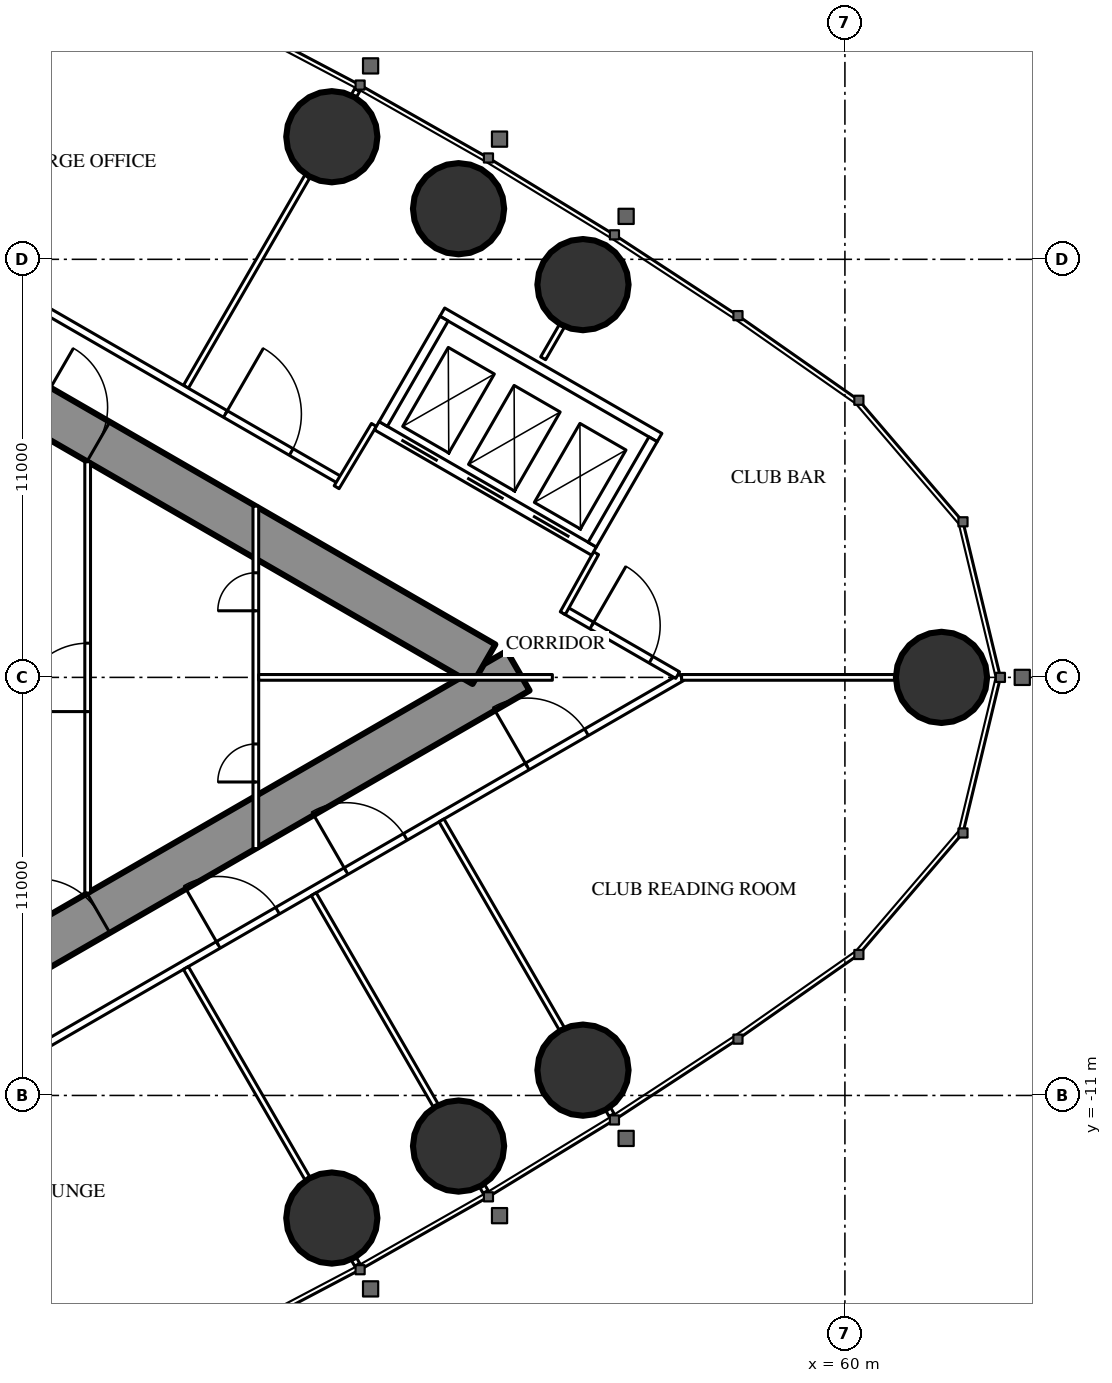
"""IFC4 building model, lengths in metres.
Left out: names, types, materials, properties, quantities, classifications, styles, units other than length and angle.
Written with IfcOpenShell. Run it as: python <this file> out.ifc"""

import sys

from ifc_helpers import new_model, si_unit, direction, frame, frame_2d, origin, origin_2d, place, context, subcontext, project, spatial, rectangle, circle, extrude, element, fill, save


model = new_model("IFC4")
c1 = context("Model", 3, precision=1e-05, world=origin(), true_north=direction((0.0, 1.0)))
c2 = subcontext(c1, "Body", "Model", "MODEL_VIEW")
j1 = project(units=[si_unit("LENGTHUNIT", "METRE"), si_unit("PLANEANGLEUNIT", "RADIAN")], contexts=[c1])
p1 = place(None, origin())
s1 = spatial("IfcSite", under=j1, at=p1, CompositionType="ELEMENT")
p2 = place(p1, origin())
s2 = spatial("IfcBuilding", under=s1, at=p2, CompositionType="ELEMENT")
p3 = place(p2, frame((0.0, 0.0, 247.7)))
s3 = spatial("IfcBuildingStorey", under=s2, at=p3, CompositionType="ELEMENT", Elevation=247.7)
for number, where, z_axis, x_axis in (
    (1, (62.542, 0.0, 0.0), (0.0, 0.0, 1.0), (1.0, 0.0, 0.0)),
    (2, (53.108, 10.334, 0.0), (0.0, 0.0, 1.0), (1.0, 0.0, 0.0)),
    (3, (49.834, 12.332, 0.0), (0.0, 0.0, 1.0), (1.0, 0.0, 0.0)),
    (4, (46.499, 14.226, 0.0), (0.0, 0.0, 1.0), (1.0, 0.0, 0.0)),
    (5, (46.499, -14.226, 0.0), (0.0, 0.0, 1.0), (1.0, 0.0, 0.0)),
    (6, (49.834, -12.332, 0.0), (0.0, 0.0, 1.0), (1.0, 0.0, 0.0)),
    (7, (53.108, -10.334, 0.0), (0.0, 0.0, 1.0), (1.0, 0.0, 0.0)),
):
    element("IfcColumn", number, at=place(p3, frame(where, z_axis=z_axis, x_axis=x_axis)), inside=s3, PredefinedType="COLUMN", context=c2, shape_type="SweptSolid", body=[
        extrude(circle(Radius=1.2, at=origin_2d()), origin(), (0.0, 0.0, 1.0), 4.2),
    ])
p4 = place(p3, frame((27.2, -13.8, 0.0), z_axis=(0.0, 0.0, 1.0), x_axis=(0.866027159892, 0.499996958321, 0.0)))
e8 = element("IfcWall", 8, at=p4, inside=s3, PredefinedType="SHEAR", context=c2, shape_type="SweptSolid", body=[
    extrude(rectangle(XDim=27.947, YDim=1.2, at=frame_2d((13.973, 0.0))), origin(), (0.0, 0.0, 1.0), 4.2),
])
p5 = place(p4, frame((4.6, 0.0, 0.0)))
e9 = element("IfcOpeningElement", 9, at=p5, cuts=e8, PredefinedType="OPENING", context=c2, shape_type="SweptSolid", body=[
    extrude(rectangle(XDim=1.0, YDim=2.2, at=frame_2d((0.5, 1.1))), frame((0.0, 0.61, 0.0), z_axis=(0.0, -1.0, 0.0), x_axis=(1.0, 0.0, 0.0)), (0.0, 0.0, 1.0), 1.22),
])
p6 = place(p4, frame((13.395, 0.0, 0.0)))
e10 = element("IfcOpeningElement", 10, at=p6, cuts=e8, PredefinedType="OPENING", context=c2, shape_type="SweptSolid", body=[
    extrude(rectangle(XDim=1.8, YDim=2.2, at=frame_2d((0.9, 1.1))), frame((0.0, 0.61, 0.0), z_axis=(0.0, -1.0, 0.0), x_axis=(1.0, 0.0, 0.0)), (0.0, 0.0, 1.0), 1.22),
])
p7 = place(p3, frame((27.2, 13.8, 0.0), z_axis=(0.0, 0.0, 1.0), x_axis=(0.866024515034, -0.500001539357, 0.0)))
e11 = element("IfcWall", 11, at=p7, inside=s3, PredefinedType="SHEAR", context=c2, shape_type="SweptSolid", body=[
    extrude(rectangle(XDim=26.907, YDim=1.2, at=frame_2d((13.454, 0.0))), origin(), (0.0, 0.0, 1.0), 4.2),
])
p8 = place(p7, frame((4.6, 0.0, 0.0)))
e12 = element("IfcOpeningElement", 12, at=p8, cuts=e11, PredefinedType="OPENING", context=c2, shape_type="SweptSolid", body=[
    extrude(rectangle(XDim=1.0, YDim=2.2, at=frame_2d((0.5, 1.1))), frame((0.0, 0.61, 0.0), z_axis=(0.0, -1.0, 0.0), x_axis=(1.0, 0.0, 0.0)), (0.0, 0.0, 1.0), 1.22),
])
p9 = place(p7, frame((13.395, 0.0, 0.0)))
e13 = element("IfcOpeningElement", 13, at=p9, cuts=e11, PredefinedType="OPENING", context=c2, shape_type="SweptSolid", body=[
    extrude(rectangle(XDim=1.8, YDim=2.2, at=frame_2d((0.9, 1.1))), frame((0.0, 0.61, 0.0), z_axis=(0.0, -1.0, 0.0), x_axis=(1.0, 0.0, 0.0)), (0.0, 0.0, 1.0), 1.22),
])
p10 = place(p3, frame((28.907, -15.47, 0.0), z_axis=(0.0, 0.0, 1.0), x_axis=(0.866023700353, 0.500002950419, 0.0)))
e14 = element("IfcWall", 14, at=p10, inside=s3, PredefinedType="PARTITIONING", context=c2, shape_type="SweptSolid", body=[
    extrude(rectangle(XDim=30.941, YDim=0.2, at=frame_2d((15.47, 0.0))), origin(), (0.0, 0.0, 1.0), 3.95),
])
p11 = place(p10, frame((7.124, 0.0, 0.0)))
e15 = element("IfcOpeningElement", 15, at=p11, cuts=e14, PredefinedType="OPENING", context=c2, shape_type="SweptSolid", body=[
    extrude(rectangle(XDim=1.8, YDim=2.2, at=frame_2d((0.9, 1.1))), frame((0.0, 0.11, 0.0), z_axis=(0.0, -1.0, 0.0), x_axis=(1.0, 0.0, 0.0)), (0.0, 0.0, 1.0), 0.22),
])
p12 = place(p10, frame((16.865, 0.0, 0.0)))
e16 = element("IfcOpeningElement", 16, at=p12, cuts=e14, PredefinedType="OPENING", context=c2, shape_type="SweptSolid", body=[
    extrude(rectangle(XDim=1.8, YDim=2.2, at=frame_2d((0.9, 1.1))), frame((0.0, 0.11, 0.0), z_axis=(0.0, -1.0, 0.0), x_axis=(1.0, 0.0, 0.0)), (0.0, 0.0, 1.0), 0.22),
])
p13 = place(p10, frame((20.748, 0.0, 0.0)))
e17 = element("IfcOpeningElement", 17, at=p13, cuts=e14, PredefinedType="OPENING", context=c2, shape_type="SweptSolid", body=[
    extrude(rectangle(XDim=1.8, YDim=2.2, at=frame_2d((0.9, 1.1))), frame((0.0, 0.11, 0.0), z_axis=(0.0, -1.0, 0.0), x_axis=(1.0, 0.0, 0.0)), (0.0, 0.0, 1.0), 0.22),
])
p14 = place(p10, frame((26.252, 0.0, 0.0)))
e18 = element("IfcOpeningElement", 18, at=p14, cuts=e14, PredefinedType="OPENING", context=c2, shape_type="SweptSolid", body=[
    extrude(rectangle(XDim=1.8, YDim=2.2, at=frame_2d((0.9, 1.1))), frame((0.0, 0.11, 0.0), z_axis=(0.0, -1.0, 0.0), x_axis=(1.0, 0.0, 0.0)), (0.0, 0.0, 1.0), 0.22),
])
p15 = place(p3, frame((42.66, -7.646, 0.0), z_axis=(0.0, 0.0, 1.0), x_axis=(0.499996592859, -0.866027370889, 0.0)))
e19 = element("IfcWall", 19, at=p15, inside=s3, PredefinedType="PARTITIONING", context=c2, shape_type="SweptSolid", body=[
    extrude(rectangle(XDim=6.398, YDim=0.15, at=frame_2d((3.199, 0.0))), origin(), (0.0, 0.0, 1.0), 3.05),
])
p16 = place(p3, frame((47.079, -15.3, 0.0), z_axis=(0.0, 0.0, 1.0), x_axis=(0.499212083968, -0.866479829667, 0.0)))
e20 = element("IfcWall", 20, at=p16, inside=s3, PredefinedType="PARTITIONING", context=c2, shape_type="SweptSolid", body=[
    extrude(rectangle(XDim=0.179, YDim=0.15, at=frame_2d((0.09, 0.0))), origin(), (0.0, 0.0, 1.0), 3.05),
])
p17 = place(p3, frame((46.023, -5.704, 0.0), z_axis=(0.0, 0.0, 1.0), x_axis=(0.499984478165, -0.866034365135, 0.0)))
e21 = element("IfcWall", 21, at=p17, inside=s3, PredefinedType="PARTITIONING", context=c2, shape_type="SweptSolid", body=[
    extrude(rectangle(XDim=6.426, YDim=0.15, at=frame_2d((3.213, 0.0))), origin(), (0.0, 0.0, 1.0), 3.05),
])
p18 = place(p3, frame((50.456, -13.382, 0.0), z_axis=(0.0, 0.0, 1.0), x_axis=(0.500661834965, -0.865642955848, 0.0)))
e22 = element("IfcWall", 22, at=p18, inside=s3, PredefinedType="PARTITIONING", context=c2, shape_type="SweptSolid", body=[
    extrude(rectangle(XDim=0.18, YDim=0.15, at=frame_2d((0.09, 0.0))), origin(), (0.0, 0.0, 1.0), 3.05),
])
p19 = place(p3, frame((49.385, -3.763, 0.0), z_axis=(0.0, 0.0, 1.0), x_axis=(0.499999447814, -0.866025722589, 0.0)))
e23 = element("IfcWall", 23, at=p19, inside=s3, PredefinedType="PARTITIONING", context=c2, shape_type="SweptSolid", body=[
    extrude(rectangle(XDim=6.333, YDim=0.15, at=frame_2d((3.166, 0.0))), origin(), (0.0, 0.0, 1.0), 3.05),
])
p20 = place(p3, frame((53.771, -11.36, 0.0), z_axis=(0.0, 0.0, 1.0), x_axis=(0.499524978789, -0.866299483762, 0.0)))
e24 = element("IfcWall", 24, at=p20, inside=s3, PredefinedType="PARTITIONING", context=c2, shape_type="SweptSolid", body=[
    extrude(rectangle(XDim=0.178, YDim=0.15, at=frame_2d((0.089, 0.0))), origin(), (0.0, 0.0, 1.0), 3.05),
])
p21 = place(p3, frame((42.66, 7.646, 0.0), z_axis=(0.0, 0.0, 1.0), x_axis=(0.499996592859, 0.866027370889, 0.0)))
e25 = element("IfcWall", 25, at=p21, inside=s3, PredefinedType="PARTITIONING", context=c2, shape_type="SweptSolid", body=[
    extrude(rectangle(XDim=6.398, YDim=0.15, at=frame_2d((3.199, 0.0))), origin(), (0.0, 0.0, 1.0), 3.05),
])
p22 = place(p3, frame((47.079, 15.3, 0.0), z_axis=(0.0, 0.0, 1.0), x_axis=(0.499212083968, 0.866479829667, 0.0)))
e26 = element("IfcWall", 26, at=p22, inside=s3, PredefinedType="PARTITIONING", context=c2, shape_type="SweptSolid", body=[
    extrude(rectangle(XDim=0.179, YDim=0.15, at=frame_2d((0.09, 0.0))), origin(), (0.0, 0.0, 1.0), 3.05),
])
p23 = place(p3, frame((55.702, 0.0, 0.0), z_axis=(0.0, 0.0, 1.0), x_axis=(1.0, 0.0, 0.0)))
e27 = element("IfcWall", 27, at=p23, inside=s3, PredefinedType="PARTITIONING", context=c2, shape_type="SweptSolid", body=[
    extrude(rectangle(XDim=5.619, YDim=0.15, at=frame_2d((2.81, 0.0))), origin(), (0.0, 0.0, 1.0), 3.05),
])
p24 = place(p3, frame((52.06, 8.396, 0.0), z_axis=(0.0, 0.0, 1.0), x_axis=(0.500095379624, 0.865970329329, 0.0)))
e28 = element("IfcWall", 28, at=p24, inside=s3, PredefinedType="PARTITIONING", context=c2, shape_type="SweptSolid", body=[
    extrude(rectangle(XDim=0.982, YDim=0.15, at=frame_2d((0.491, 0.0))), origin(), (0.0, 0.0, 1.0), 3.95),
])
p25 = place(p3, frame((28.907, 15.47, 0.0), z_axis=(0.0, 0.0, 1.0), x_axis=(0.866026627509, -0.499997880441, 0.0)))
e29 = element("IfcWall", 29, at=p25, inside=s3, PredefinedType="PARTITIONING", context=c2, shape_type="SweptSolid", body=[
    extrude(rectangle(XDim=20.563, YDim=0.2, at=frame_2d((10.282, 0.0))), origin(), (0.0, 0.0, 1.0), 3.95),
])
p26 = place(p25, frame((17.081, 0.0, 0.0)))
e30 = element("IfcOpeningElement", 30, at=p26, cuts=e29, PredefinedType="OPENING", context=c2, shape_type="SweptSolid", body=[
    extrude(rectangle(XDim=2.0, YDim=2.4, at=frame_2d((1.0, 1.2))), frame((0.0, 0.11, 0.0), z_axis=(0.0, -1.0, 0.0), x_axis=(1.0, 0.0, 0.0)), (0.0, 0.0, 1.0), 0.22),
])
p27 = place(p25, frame((7.124, 0.0, 0.0)))
e31 = element("IfcOpeningElement", 31, at=p27, cuts=e29, PredefinedType="OPENING", context=c2, shape_type="SweptSolid", body=[
    extrude(rectangle(XDim=1.8, YDim=2.2, at=frame_2d((0.9, 1.1))), frame((0.0, 0.11, 0.0), z_axis=(0.0, -1.0, 0.0), x_axis=(1.0, 0.0, 0.0)), (0.0, 0.0, 1.0), 0.22),
])
p28 = place(p3, frame((52.639, 1.769, 0.0), z_axis=(0.0, 0.0, 1.0), x_axis=(0.866027340901, -0.4999966448, 0.0)))
e32 = element("IfcWall", 32, at=p28, inside=s3, PredefinedType="PARTITIONING", context=c2, shape_type="SweptSolid", body=[
    extrude(rectangle(XDim=3.417, YDim=0.2, at=frame_2d((1.708, 0.0))), origin(), (0.0, 0.0, 1.0), 3.95),
])
p29 = place(p28, frame((0.809, 0.0, 0.0)))
e33 = element("IfcOpeningElement", 33, at=p29, cuts=e32, PredefinedType="OPENING", context=c2, shape_type="SweptSolid", body=[
    extrude(rectangle(XDim=1.8, YDim=2.2, at=frame_2d((0.9, 1.1))), frame((0.0, 0.11, 0.0), z_axis=(0.0, -1.0, 0.0), x_axis=(1.0, 0.0, 0.0)), (0.0, 0.0, 1.0), 0.22),
])
p30 = place(p3, frame((47.606, 6.642, 0.0), z_axis=(0.0, 0.0, 1.0), x_axis=(-0.51353662755, -0.858067673418, 0.0)))
e34 = element("IfcWall", 34, at=p30, inside=s3, PredefinedType="PARTITIONING", context=c2, shape_type="SweptSolid", body=[
    extrude(rectangle(XDim=1.91, YDim=0.15, at=frame_2d((0.955, 0.0))), origin(), (0.0, 0.0, 1.0), 3.95),
])
p31 = place(p3, frame((52.576, 1.689, 0.0), z_axis=(0.0, 0.0, 1.0), x_axis=(0.485482130951, 0.874246590229, 0.0)))
e35 = element("IfcWall", 35, at=p31, inside=s3, PredefinedType="PARTITIONING", context=c2, shape_type="SweptSolid", body=[
    extrude(rectangle(XDim=1.805, YDim=0.15, at=frame_2d((0.902, 0.0))), origin(), (0.0, 0.0, 1.0), 3.95),
])
p32 = place(p3, frame((40.075, -5.674, 0.0), z_axis=(0.0, 0.0, 1.0), x_axis=(0.0, 1.0, 0.0)))
e36 = element("IfcWall", 36, at=p32, inside=s3, PredefinedType="PARTITIONING", context=c2, shape_type="SweptSolid", body=[
    extrude(rectangle(XDim=11.348, YDim=0.15, at=frame_2d((5.674, 0.0))), origin(), (0.0, 0.0, 1.0), 3.95),
])
p33 = place(p32, frame((4.774, 0.0, 0.0)))
e37 = element("IfcOpeningElement", 37, at=p33, cuts=e36, PredefinedType="OPENING", context=c2, shape_type="SweptSolid", body=[
    extrude(rectangle(XDim=1.8, YDim=2.2, at=frame_2d((0.9, 1.1))), frame((0.0, 0.085, 0.0), z_axis=(0.0, -1.0, 0.0), x_axis=(1.0, 0.0, 0.0)), (0.0, 0.0, 1.0), 0.17),
])
p34 = place(p3, frame((44.5, -4.505, 0.0), z_axis=(0.0, 0.0, 1.0), x_axis=(0.0, 1.0, 0.0)))
e38 = element("IfcWall", 38, at=p34, inside=s3, PredefinedType="PARTITIONING", context=c2, shape_type="SweptSolid", body=[
    extrude(rectangle(XDim=9.009, YDim=0.15, at=frame_2d((4.505, 0.0))), origin(), (0.0, 0.0, 1.0), 3.95),
])
p35 = place(p34, frame((1.752, 0.0, 0.0)))
e39 = element("IfcOpeningElement", 39, at=p35, cuts=e38, PredefinedType="OPENING", context=c2, shape_type="SweptSolid", body=[
    extrude(rectangle(XDim=1.0, YDim=2.2, at=frame_2d((0.5, 1.1))), frame((0.0, 0.085, 0.0), z_axis=(0.0, -1.0, 0.0), x_axis=(1.0, 0.0, 0.0)), (0.0, 0.0, 1.0), 0.17),
])
p36 = place(p34, frame((6.257, 0.0, 0.0)))
e40 = element("IfcOpeningElement", 40, at=p36, cuts=e38, PredefinedType="OPENING", context=c2, shape_type="SweptSolid", body=[
    extrude(rectangle(XDim=1.0, YDim=2.2, at=frame_2d((0.5, 1.1))), frame((0.0, 0.085, 0.0), z_axis=(0.0, -1.0, 0.0), x_axis=(1.0, 0.0, 0.0)), (0.0, 0.0, 1.0), 0.17),
])
p37 = place(p3, frame((44.575, 0.0, 0.0), z_axis=(0.0, 0.0, 1.0), x_axis=(1.0, 0.0, 0.0)))
e41 = element("IfcWall", 41, at=p37, inside=s3, PredefinedType="PARTITIONING", context=c2, shape_type="SweptSolid", body=[
    extrude(rectangle(XDim=7.727, YDim=0.15, at=frame_2d((3.864, 0.0))), origin(), (0.0, 0.0, 1.0), 3.05),
])
p38 = place(p3, frame((47.681, 6.622, 0.0), z_axis=(0.0, 0.0, 1.0), x_axis=(0.86603344179, -0.499986077507, 0.0)))
e42 = element("IfcWall", 42, at=p38, inside=s3, PredefinedType="PARTITIONING", context=c2, shape_type="SweptSolid", body=[
    extrude(rectangle(XDim=6.6, YDim=0.25, at=frame_2d((3.3, 0.0))), origin(), (0.0, 0.0, 1.0), 3.95),
])
p39 = place(p38, frame((0.75, 0.0, 0.0)))
e43 = element("IfcOpeningElement", 43, at=p39, cuts=e42, PredefinedType="OPENING", context=c2, shape_type="SweptSolid", body=[
    extrude(rectangle(XDim=1.1, YDim=2.2, at=frame_2d((0.55, 1.1))), frame((0.0, 0.135, 0.0), z_axis=(0.0, -1.0, 0.0), x_axis=(1.0, 0.0, 0.0)), (0.0, 0.0, 1.0), 0.27),
])
p40 = place(p38, frame((2.75, 0.0, 0.0)))
e44 = element("IfcOpeningElement", 44, at=p40, cuts=e42, PredefinedType="OPENING", context=c2, shape_type="SweptSolid", body=[
    extrude(rectangle(XDim=1.1, YDim=2.2, at=frame_2d((0.55, 1.1))), frame((0.0, 0.135, 0.0), z_axis=(0.0, -1.0, 0.0), x_axis=(1.0, 0.0, 0.0)), (0.0, 0.0, 1.0), 0.27),
])
p41 = place(p38, frame((4.75, 0.0, 0.0)))
e45 = element("IfcOpeningElement", 45, at=p41, cuts=e42, PredefinedType="OPENING", context=c2, shape_type="SweptSolid", body=[
    extrude(rectangle(XDim=1.1, YDim=2.2, at=frame_2d((0.55, 1.1))), frame((0.0, 0.135, 0.0), z_axis=(0.0, -1.0, 0.0), x_axis=(1.0, 0.0, 0.0)), (0.0, 0.0, 1.0), 0.27),
])
p42 = place(p3, frame((49.406, 9.611, 0.0), z_axis=(0.0, 0.0, 1.0), x_axis=(0.86603344179, -0.499986077507, 0.0)))
e46 = element("IfcWall", 46, at=p42, inside=s3, PredefinedType="PARTITIONING", context=c2, shape_type="SweptSolid", body=[
    extrude(rectangle(XDim=6.6, YDim=0.25, at=frame_2d((3.3, 0.0))), origin(), (0.0, 0.0, 1.0), 3.95),
])
p43 = place(p3, frame((47.852, 6.668, 0.0), z_axis=(0.0, 0.0, 1.0), x_axis=(0.499929347863, 0.866066190972, 0.0)))
e47 = element("IfcWall", 47, at=p43, inside=s3, PredefinedType="PARTITIONING", context=c2, shape_type="SweptSolid", body=[
    extrude(rectangle(XDim=3.201, YDim=0.25, at=frame_2d((1.6, 0.0))), origin(), (0.0, 0.0, 1.0), 3.95),
])
p44 = place(p3, frame((53.352, 3.493, 0.0), z_axis=(0.0, 0.0, 1.0), x_axis=(0.499872130319, 0.866099216793, 0.0)))
e48 = element("IfcWall", 48, at=p44, inside=s3, PredefinedType="PARTITIONING", context=c2, shape_type="SweptSolid", body=[
    extrude(rectangle(XDim=3.2, YDim=0.25, at=frame_2d((1.6, 0.0))), origin(), (0.0, 0.0, 1.0), 3.95),
])
p45 = place(p12, origin())
e49 = element("IfcDoor", 49, at=p45, inside=s3, OperationType="DOUBLE_DOOR_SINGLE_SWING", PredefinedType="DOOR", context=c2, shape_type="SweptSolid", body=[
    extrude(rectangle(XDim=1.8, YDim=2.2, at=frame_2d((0.9, 1.1))), frame((0.0, 0.025, 0.0), z_axis=(0.0, -1.0, 0.0), x_axis=(1.0, 0.0, 0.0)), (0.0, 0.0, 1.0), 0.05),
])
fill(e16, e49)
p46 = place(p13, origin())
e50 = element("IfcDoor", 50, at=p46, inside=s3, OperationType="DOUBLE_DOOR_SINGLE_SWING", PredefinedType="DOOR", context=c2, shape_type="SweptSolid", body=[
    extrude(rectangle(XDim=1.8, YDim=2.2, at=frame_2d((0.9, 1.1))), frame((0.0, 0.025, 0.0), z_axis=(0.0, -1.0, 0.0), x_axis=(1.0, 0.0, 0.0)), (0.0, 0.0, 1.0), 0.05),
])
fill(e17, e50)
p47 = place(p14, origin())
e51 = element("IfcDoor", 51, at=p47, inside=s3, OperationType="DOUBLE_DOOR_SINGLE_SWING", PredefinedType="DOOR", context=c2, shape_type="SweptSolid", body=[
    extrude(rectangle(XDim=1.8, YDim=2.2, at=frame_2d((0.9, 1.1))), frame((0.0, 0.025, 0.0), z_axis=(0.0, -1.0, 0.0), x_axis=(1.0, 0.0, 0.0)), (0.0, 0.0, 1.0), 0.05),
])
fill(e18, e51)
p48 = place(p26, origin())
e52 = element("IfcDoor", 52, at=p48, inside=s3, OperationType="DOUBLE_DOOR_SINGLE_SWING", PredefinedType="DOOR", context=c2, shape_type="SweptSolid", body=[
    extrude(rectangle(XDim=2.0, YDim=2.4, at=frame_2d((1.0, 1.2))), frame((0.0, 0.025, 0.0), z_axis=(0.0, -1.0, 0.0), x_axis=(1.0, 0.0, 0.0)), (0.0, 0.0, 1.0), 0.05),
])
fill(e30, e52)
p49 = place(p29, origin())
e53 = element("IfcDoor", 53, at=p49, inside=s3, OperationType="DOUBLE_DOOR_SINGLE_SWING", PredefinedType="DOOR", context=c2, shape_type="SweptSolid", body=[
    extrude(rectangle(XDim=1.8, YDim=2.2, at=frame_2d((0.9, 1.1))), frame((0.0, 0.025, 0.0), z_axis=(0.0, -1.0, 0.0), x_axis=(1.0, 0.0, 0.0)), (0.0, 0.0, 1.0), 0.05),
])
fill(e33, e53)
p50 = place(p33, origin())
e54 = element("IfcDoor", 54, at=p50, inside=s3, OperationType="DOUBLE_DOOR_SINGLE_SWING", PredefinedType="DOOR", context=c2, shape_type="SweptSolid", body=[
    extrude(rectangle(XDim=1.8, YDim=2.2, at=frame_2d((0.9, 1.1))), frame((0.0, 0.025, 0.0), z_axis=(0.0, -1.0, 0.0), x_axis=(1.0, 0.0, 0.0)), (0.0, 0.0, 1.0), 0.05),
])
fill(e37, e54)
p51 = place(p35, origin())
e55 = element("IfcDoor", 55, at=p51, inside=s3, OperationType="SINGLE_SWING_LEFT", PredefinedType="DOOR", context=c2, shape_type="SweptSolid", body=[
    extrude(rectangle(XDim=1.0, YDim=2.2, at=frame_2d((0.5, 1.1))), frame((0.0, 0.025, 0.0), z_axis=(0.0, -1.0, 0.0), x_axis=(1.0, 0.0, 0.0)), (0.0, 0.0, 1.0), 0.05),
])
fill(e39, e55)
p52 = place(p36, origin())
e56 = element("IfcDoor", 56, at=p52, inside=s3, OperationType="SINGLE_SWING_LEFT", PredefinedType="DOOR", context=c2, shape_type="SweptSolid", body=[
    extrude(rectangle(XDim=1.0, YDim=2.2, at=frame_2d((0.5, 1.1))), frame((0.0, 0.025, 0.0), z_axis=(0.0, -1.0, 0.0), x_axis=(1.0, 0.0, 0.0)), (0.0, 0.0, 1.0), 0.05),
])
fill(e40, e56)
p53 = place(p6, origin())
e57 = element("IfcDoor", 57, at=p53, inside=s3, OperationType="DOUBLE_DOOR_SINGLE_SWING", PredefinedType="DOOR", context=c2, shape_type="SweptSolid", body=[
    extrude(rectangle(XDim=1.8, YDim=2.2, at=frame_2d((0.9, 1.1))), frame((0.0, 0.025, 0.0), z_axis=(0.0, -1.0, 0.0), x_axis=(1.0, 0.0, 0.0)), (0.0, 0.0, 1.0), 0.05),
])
fill(e10, e57)
p54 = place(p9, origin())
e58 = element("IfcDoor", 58, at=p54, inside=s3, OperationType="DOUBLE_DOOR_SINGLE_SWING", PredefinedType="DOOR", context=c2, shape_type="SweptSolid", body=[
    extrude(rectangle(XDim=1.8, YDim=2.2, at=frame_2d((0.9, 1.1))), frame((0.0, 0.025, 0.0), z_axis=(0.0, -1.0, 0.0), x_axis=(1.0, 0.0, 0.0)), (0.0, 0.0, 1.0), 0.05),
])
fill(e13, e58)
p55 = place(p39, origin())
e59 = element("IfcDoor", 59, at=p55, inside=s3, OperationType="DOUBLE_DOOR_SLIDING", PredefinedType="USERDEFINED", context=c2, shape_type="SweptSolid", body=[
    extrude(rectangle(XDim=1.1, YDim=2.2, at=frame_2d((0.55, 1.1))), frame((0.0, 0.025, 0.0), z_axis=(0.0, -1.0, 0.0), x_axis=(1.0, 0.0, 0.0)), (0.0, 0.0, 1.0), 0.05),
])
fill(e43, e59)
p56 = place(p40, origin())
e60 = element("IfcDoor", 60, at=p56, inside=s3, OperationType="DOUBLE_DOOR_SLIDING", PredefinedType="USERDEFINED", context=c2, shape_type="SweptSolid", body=[
    extrude(rectangle(XDim=1.1, YDim=2.2, at=frame_2d((0.55, 1.1))), frame((0.0, 0.025, 0.0), z_axis=(0.0, -1.0, 0.0), x_axis=(1.0, 0.0, 0.0)), (0.0, 0.0, 1.0), 0.05),
])
fill(e44, e60)
p57 = place(p41, origin())
e61 = element("IfcDoor", 61, at=p57, inside=s3, OperationType="DOUBLE_DOOR_SLIDING", PredefinedType="USERDEFINED", context=c2, shape_type="SweptSolid", body=[
    extrude(rectangle(XDim=1.1, YDim=2.2, at=frame_2d((0.55, 1.1))), frame((0.0, 0.025, 0.0), z_axis=(0.0, -1.0, 0.0), x_axis=(1.0, 0.0, 0.0)), (0.0, 0.0, 1.0), 0.05),
])
fill(e45, e61)
save(model, sys.argv[1])
